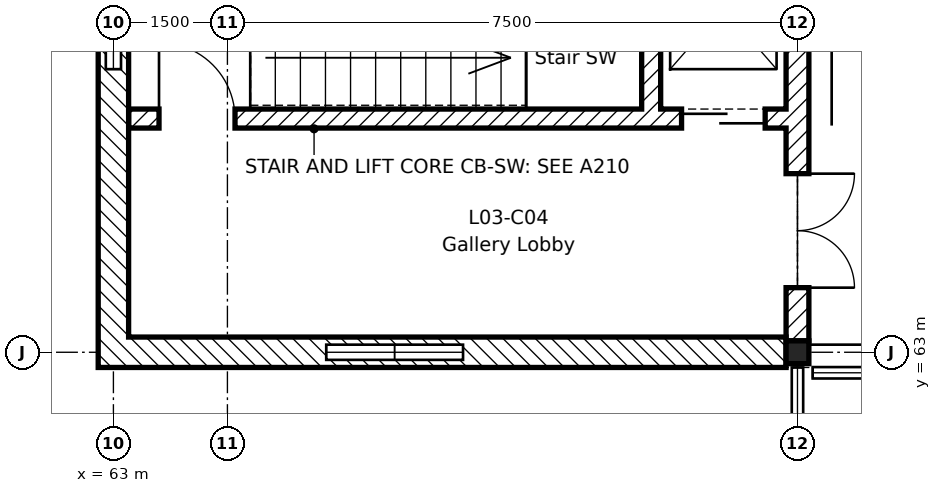
"""IFC4 building model, lengths in metres.
Left out: names, types, materials, properties, quantities, classifications, styles, units other than length and angle.
Written with IfcOpenShell. Run it as: python <this file> out.ifc"""

import sys

from ifc_helpers import new_model, si_unit, direction, frame, frame_2d, origin, origin_2d, place, context, subcontext, project, spatial, rectangle, hollow_rectangle, extrude, element, fill, save


model = new_model("IFC4")
c1 = context("Model", 3, precision=1e-05, world=origin(), true_north=direction((0.0, 1.0)))
c2 = subcontext(c1, "Body", "Model", "MODEL_VIEW")
j1 = project(units=[si_unit("LENGTHUNIT", "METRE"), si_unit("PLANEANGLEUNIT", "RADIAN")], contexts=[c1])
p1 = place(None, origin())
s1 = spatial("IfcSite", under=j1, at=p1, CompositionType="ELEMENT")
p2 = place(p1, origin())
s2 = spatial("IfcBuilding", under=s1, at=p2, CompositionType="ELEMENT")
p3 = place(p2, frame((0.0, 0.0, 14.4)))
s3 = spatial("IfcBuildingStorey", under=s2, at=p3, CompositionType="ELEMENT", Elevation=14.4)
p4 = place(p3, frame((72.0, 63.0, -0.25), z_axis=(0.0, 0.0, 1.0), x_axis=(1.0, 0.0, 0.0)))
e1 = element("IfcColumn", 1, at=p4, inside=s3, PredefinedType="COLUMN", context=c2, shape_type="SweptSolid", body=[
    extrude(hollow_rectangle(XDim=0.3, YDim=0.3, WallThickness=0.016, at=origin_2d()), origin(), (0.0, 0.0, 1.0), 4.2),
])
p5 = place(p3, frame((72.0, 63.15, 0.0), z_axis=(0.0, 0.0, 1.0), x_axis=(0.0, 1.0, 0.0)))
e2 = element("IfcWall", 2, at=p5, inside=s3, PredefinedType="SHEAR", context=c2, shape_type="SweptSolid", body=[
    extrude(rectangle(XDim=9.0, YDim=0.3, at=frame_2d((4.5, 0.0))), origin(), (0.0, 0.0, 1.0), 4.0),
])
p6 = place(p5, frame((0.7, 0.0, 0.0)))
e3 = element("IfcOpeningElement", 3, at=p6, cuts=e2, PredefinedType="OPENING", context=c2, shape_type="SweptSolid", body=[
    extrude(rectangle(XDim=1.5, YDim=2.4, at=frame_2d((0.75, 1.2))), frame((0.0, 0.16, 0.0), z_axis=(0.0, -1.0, 0.0), x_axis=(1.0, 0.0, 0.0)), (0.0, 0.0, 1.0), 0.32),
])
p7 = place(p3, frame((63.2, 66.075, 0.0), z_axis=(0.0, 0.0, 1.0), x_axis=(1.0, 0.0, 0.0)))
e4 = element("IfcWall", 4, at=p7, inside=s3, PredefinedType="SHEAR", context=c2, shape_type="SweptSolid", body=[
    extrude(rectangle(XDim=8.65, YDim=0.25, at=frame_2d((4.325, 0.0))), origin(), (0.0, 0.0, 1.0), 4.0),
])
p8 = place(p7, frame((0.4, 0.0, 0.0)))
e5 = element("IfcOpeningElement", 5, at=p8, cuts=e4, PredefinedType="OPENING", context=c2, shape_type="SweptSolid", body=[
    extrude(rectangle(XDim=1.0, YDim=2.1, at=frame_2d((0.5, 1.05))), frame((0.0, 0.135, 0.0), z_axis=(0.0, -1.0, 0.0), x_axis=(1.0, 0.0, 0.0)), (0.0, 0.0, 1.0), 0.27),
])
p9 = place(p7, frame((7.275, 0.0, 0.0)))
e6 = element("IfcOpeningElement", 6, at=p9, cuts=e4, PredefinedType="OPENING", context=c2, shape_type="SweptSolid", body=[
    extrude(rectangle(XDim=1.1, YDim=2.1, at=frame_2d((0.55, 1.05))), frame((0.0, 0.135, 0.0), z_axis=(0.0, -1.0, 0.0), x_axis=(1.0, 0.0, 0.0)), (0.0, 0.0, 1.0), 0.27),
])
p10 = place(p3, frame((70.075, 66.2, 0.0), z_axis=(0.0, 0.0, 1.0), x_axis=(0.0, 1.0, 0.0)))
e7 = element("IfcWall", 7, at=p10, inside=s3, PredefinedType="SHEAR", context=c2, shape_type="SweptSolid", body=[
    extrude(rectangle(XDim=2.85, YDim=0.25, at=frame_2d((1.425, 0.0))), origin(), (0.0, 0.0, 1.0), 4.0),
])
p11 = place(p3, frame((62.8, 63.0, 0.0), z_axis=(0.0, 0.0, 1.0), x_axis=(1.0, 0.0, 0.0)))
e8 = element("IfcWall", 8, at=p11, inside=s3, PredefinedType="STANDARD", context=c2, shape_type="SweptSolid", body=[
    extrude(rectangle(XDim=3.0, YDim=0.4, at=frame_2d((1.5, 0.0))), origin(), (0.0, 0.0, 1.0), 4.0),
])
p12 = place(p3, frame((67.6, 63.0, 0.0), z_axis=(0.0, 0.0, 1.0), x_axis=(1.0, 0.0, 0.0)))
e9 = element("IfcWall", 9, at=p12, inside=s3, PredefinedType="STANDARD", context=c2, shape_type="SweptSolid", body=[
    extrude(rectangle(XDim=4.25, YDim=0.4, at=frame_2d((2.125, 0.0))), origin(), (0.0, 0.0, 1.0), 4.0),
])
p13 = place(p3, frame((65.8, 63.0, 0.0), z_axis=(0.0, 0.0, 1.0), x_axis=(1.0, 0.0, 0.0)))
e10 = element("IfcWall", 10, at=p13, inside=s3, PredefinedType="STANDARD", context=c2, shape_type="SweptSolid", body=[
    extrude(rectangle(XDim=1.8, YDim=0.4, at=frame_2d((0.9, 0.0))), origin(), (0.0, 0.0, 1.0), 0.9),
])
p14 = place(p3, frame((63.0, 63.2, 0.0), z_axis=(0.0, 0.0, 1.0), x_axis=(0.0, 1.0, 0.0)))
e11 = element("IfcWall", 11, at=p14, inside=s3, PredefinedType="STANDARD", context=c2, shape_type="SweptSolid", body=[
    extrude(rectangle(XDim=3.525, YDim=0.4, at=frame_2d((1.763, 0.0))), origin(), (0.0, 0.0, 1.0), 4.0),
])
p15 = place(p3, frame((63.0, 66.725, 0.0), z_axis=(0.0, 0.0, 1.0), x_axis=(0.0, 1.0, 0.0)))
e12 = element("IfcWall", 12, at=p15, inside=s3, PredefinedType="STANDARD", context=c2, shape_type="SweptSolid", body=[
    extrude(rectangle(XDim=1.8, YDim=0.4, at=frame_2d((0.9, 0.0))), origin(), (0.0, 0.0, 1.0), 0.9),
])
p16 = place(p8, origin())
e13 = element("IfcDoor", 13, at=p16, inside=s3, OperationType="SINGLE_SWING_LEFT", PredefinedType="DOOR", context=c2, shape_type="SweptSolid", body=[
    extrude(rectangle(XDim=1.0, YDim=2.1, at=frame_2d((0.5, 1.05))), frame((0.0, 0.025, 0.0), z_axis=(0.0, -1.0, 0.0), x_axis=(1.0, 0.0, 0.0)), (0.0, 0.0, 1.0), 0.05),
])
fill(e5, e13)
p17 = place(p6, frame((1.5, 0.0, 0.0), z_axis=(0.0, 0.0, 1.0), x_axis=(-1.0, 0.0, 0.0)))
e14 = element("IfcDoor", 14, at=p17, inside=s3, OperationType="DOUBLE_DOOR_SINGLE_SWING", PredefinedType="DOOR", context=c2, shape_type="SweptSolid", body=[
    extrude(rectangle(XDim=1.5, YDim=2.4, at=frame_2d((0.75, 1.2))), frame((0.0, 0.025, 0.0), z_axis=(0.0, -1.0, 0.0), x_axis=(1.0, 0.0, 0.0)), (0.0, 0.0, 1.0), 0.05),
])
fill(e3, e14)
p18 = place(p9, frame((1.1, 0.0, 0.0), z_axis=(0.0, 0.0, 1.0), x_axis=(-1.0, 0.0, 0.0)))
e15 = element("IfcDoor", 15, at=p18, inside=s3, OperationType="SLIDING_TO_LEFT", PredefinedType="DOOR", context=c2, shape_type="SweptSolid", body=[
    extrude(rectangle(XDim=1.1, YDim=2.1, at=frame_2d((0.55, 1.05))), frame((0.0, 0.025, 0.0), z_axis=(0.0, -1.0, 0.0), x_axis=(1.0, 0.0, 0.0)), (0.0, 0.0, 1.0), 0.05),
])
fill(e6, e15)
save(model, sys.argv[1])
